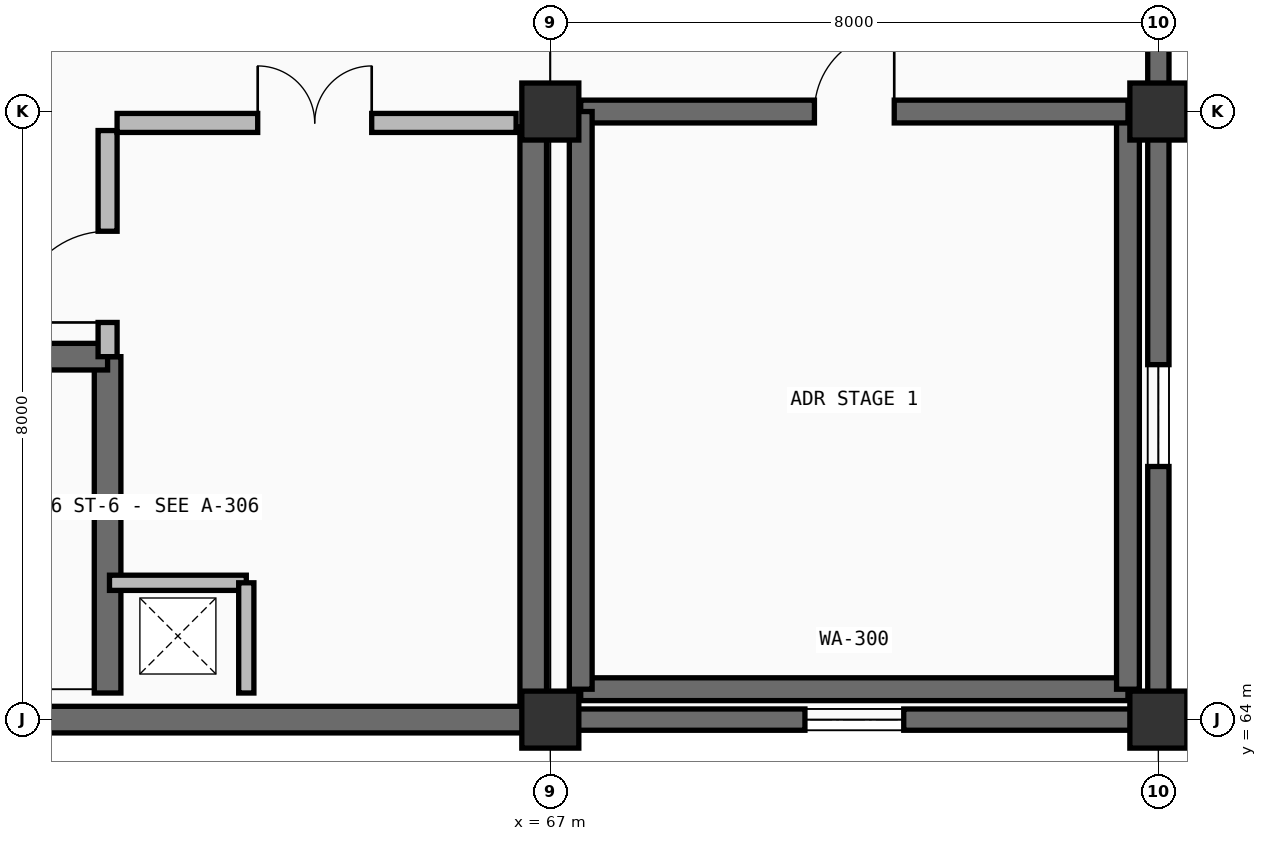
"""IFC4 building model, lengths in metres.
Left out: names, types, materials, properties, quantities, classifications, styles, units other than length and angle.
Written with IfcOpenShell. Run it as: python <this file> out.ifc"""

import sys

from ifc_helpers import new_model, si_unit, direction, frame, frame_2d, origin, origin_2d, place, context, subcontext, project, spatial, rectangle, extrude, element, fill, save


model = new_model("IFC4")
c1 = context("Model", 3, precision=1e-05, world=origin(), true_north=direction((0.0, 1.0)))
c2 = subcontext(c1, "Body", "Model", "MODEL_VIEW")
j1 = project(units=[si_unit("LENGTHUNIT", "METRE"), si_unit("PLANEANGLEUNIT", "RADIAN")], contexts=[c1])
p1 = place(None, origin())
s1 = spatial("IfcSite", under=j1, at=p1, CompositionType="ELEMENT")
p2 = place(p1, origin())
s2 = spatial("IfcBuilding", under=s1, at=p2, CompositionType="ELEMENT")
p3 = place(p2, frame((0.0, 0.0, 5.4)))
s3 = spatial("IfcBuildingStorey", under=s2, at=p3, CompositionType="ELEMENT", Elevation=5.4)
for number, where, z_axis, x_axis in (
    (1, (67.0, 64.0, 0.0), (0.0, 0.0, 1.0), (1.0, 0.0, 0.0)),
    (2, (67.0, 72.0, 0.0), (0.0, 0.0, 1.0), (1.0, 0.0, 0.0)),
    (3, (75.0, 64.0, 0.0), (0.0, 0.0, 1.0), (1.0, 0.0, 0.0)),
    (4, (75.0, 72.0, 0.0), (0.0, 0.0, 1.0), (1.0, 0.0, 0.0)),
):
    element("IfcColumn", number, at=place(p3, frame(where, z_axis=z_axis, x_axis=x_axis)), inside=s3, PredefinedType="COLUMN", context=c2, shape_type="SweptSolid", body=[
        extrude(rectangle(XDim=0.75, YDim=0.75, at=origin_2d()), origin(), (0.0, 0.0, 1.0), 4.5),
    ])
p4 = place(p3, frame((75.0, 80.0, 0.0), z_axis=(0.0, 0.0, 1.0), x_axis=(0.0, -1.0, 0.0)))
e5 = element("IfcWall", 5, at=p4, inside=s3, PredefinedType="SOLIDWALL", context=c2, shape_type="SweptSolid", body=[
    extrude(rectangle(XDim=8.0, YDim=0.28, at=frame_2d((4.0, 0.0))), origin(), (0.0, 0.0, 1.0), 4.5),
])
p5 = place(p4, frame((3.4, 0.0, 0.85)))
e6 = element("IfcOpeningElement", 6, at=p5, cuts=e5, PredefinedType="OPENING", context=c2, shape_type="SweptSolid", body=[
    extrude(rectangle(XDim=1.2, YDim=2.2, at=frame_2d((0.6, 1.1))), frame((0.0, 0.15, 0.0), z_axis=(0.0, -1.0, 0.0), x_axis=(1.0, 0.0, 0.0)), (0.0, 0.0, 1.0), 0.3),
])
p6 = place(p3, frame((75.0, 72.0, 0.0), z_axis=(0.0, 0.0, 1.0), x_axis=(0.0, -1.0, 0.0)))
e7 = element("IfcWall", 7, at=p6, inside=s3, PredefinedType="SOLIDWALL", context=c2, shape_type="SweptSolid", body=[
    extrude(rectangle(XDim=8.0, YDim=0.28, at=frame_2d((4.0, 0.0))), origin(), (0.0, 0.0, 1.0), 4.5),
])
p7 = place(p6, frame((3.33, 0.0, 0.85)))
e8 = element("IfcOpeningElement", 8, at=p7, cuts=e7, PredefinedType="OPENING", context=c2, shape_type="SweptSolid", body=[
    extrude(rectangle(XDim=1.34, YDim=2.5, at=frame_2d((0.67, 1.25))), frame((0.0, 0.15, 0.0), z_axis=(0.0, -1.0, 0.0), x_axis=(1.0, 0.0, 0.0)), (0.0, 0.0, 1.0), 0.3),
])
p8 = place(p3, frame((75.0, 64.0, 0.0), z_axis=(0.0, 0.0, 1.0), x_axis=(-1.0, 0.0, 0.0)))
e9 = element("IfcWall", 9, at=p8, inside=s3, PredefinedType="SOLIDWALL", context=c2, shape_type="SweptSolid", body=[
    extrude(rectangle(XDim=8.0, YDim=0.28, at=frame_2d((4.0, 0.0))), origin(), (0.0, 0.0, 1.0), 4.5),
])
p9 = place(p8, frame((3.35, 0.0, 0.85)))
e10 = element("IfcOpeningElement", 10, at=p9, cuts=e9, PredefinedType="OPENING", context=c2, shape_type="SweptSolid", body=[
    extrude(rectangle(XDim=1.3, YDim=2.4, at=frame_2d((0.65, 1.2))), frame((0.0, 0.15, 0.0), z_axis=(0.0, -1.0, 0.0), x_axis=(1.0, 0.0, 0.0)), (0.0, 0.0, 1.0), 0.3),
])
p10 = place(p3, frame((67.0, 64.0, 0.0), z_axis=(0.0, 0.0, 1.0), x_axis=(-1.0, 0.0, 0.0)))
e11 = element("IfcWall", 11, at=p10, inside=s3, PredefinedType="SHEAR", context=c2, shape_type="SweptSolid", body=[
    extrude(rectangle(XDim=8.0, YDim=0.35, at=frame_2d((4.0, 0.0))), origin(), (0.0, 0.0, 1.0), 4.5),
])
p11 = place(p3, frame((61.175, 64.35, 0.0), z_axis=(0.0, 0.0, 1.0), x_axis=(0.0, 1.0, 0.0)))
e12 = element("IfcWall", 12, at=p11, inside=s3, PredefinedType="SHEAR", context=c2, shape_type="SweptSolid", body=[
    extrude(rectangle(XDim=4.425, YDim=0.35, at=frame_2d((2.212, 0.0))), origin(), (0.0, 0.0, 1.0), 4.2),
])
p12 = place(p3, frame((66.775, 64.2, 0.0), z_axis=(0.0, 0.0, 1.0), x_axis=(0.0, 1.0, 0.0)))
e13 = element("IfcWall", 13, at=p12, inside=s3, PredefinedType="SHEAR", context=c2, shape_type="SweptSolid", body=[
    extrude(rectangle(XDim=7.6, YDim=0.35, at=frame_2d((3.8, 0.0))), origin(), (0.0, 0.0, 1.0), 4.2),
])
p13 = place(p3, frame((61.2, 65.8, 0.0), z_axis=(0.0, 0.0, 1.0), x_axis=(1.0, 0.0, 0.0)))
e14 = element("IfcWall", 14, at=p13, inside=s3, PredefinedType="PARTITIONING", context=c2, shape_type="SweptSolid", body=[
    extrude(rectangle(XDim=1.8, YDim=0.2, at=frame_2d((0.9, 0.0))), origin(), (0.0, 0.0, 1.0), 4.2),
])
p14 = place(p3, frame((63.0, 64.35, 0.0), z_axis=(0.0, 0.0, 1.0), x_axis=(0.0, 1.0, 0.0)))
e15 = element("IfcWall", 15, at=p14, inside=s3, PredefinedType="PARTITIONING", context=c2, shape_type="SweptSolid", body=[
    extrude(rectangle(XDim=1.45, YDim=0.2, at=frame_2d((0.725, 0.0))), origin(), (0.0, 0.0, 1.0), 4.2),
])
p15 = place(p3, frame((51.35, 68.775, 0.0), z_axis=(0.0, 0.0, 1.0), x_axis=(1.0, 0.0, 0.0)))
e16 = element("IfcWall", 16, at=p15, inside=s3, PredefinedType="SHEAR", context=c2, shape_type="SweptSolid", body=[
    extrude(rectangle(XDim=9.825, YDim=0.35, at=frame_2d((4.913, 0.0))), origin(), (0.0, 0.0, 1.0), 4.2),
])
p16 = place(p15, frame((0.4, 0.0, 0.0)))
e17 = element("IfcOpeningElement", 17, at=p16, cuts=e16, PredefinedType="OPENING", context=c2, shape_type="SweptSolid", body=[
    extrude(rectangle(XDim=1.85, YDim=2.25, at=frame_2d((0.925, 1.125))), frame((0.0, 0.185, 0.0), z_axis=(0.0, -1.0, 0.0), x_axis=(1.0, 0.0, 0.0)), (0.0, 0.0, 1.0), 0.37),
])
p17 = place(p3, frame((61.175, 68.775, 0.0), z_axis=(0.0, 0.0, 1.0), x_axis=(0.0, 1.0, 0.0)))
e18 = element("IfcWall", 18, at=p17, inside=s3, PredefinedType="PARTITIONING", context=c2, shape_type="SweptSolid", body=[
    extrude(rectangle(XDim=2.975, YDim=0.25, at=frame_2d((1.488, 0.0))), origin(), (0.0, 0.0, 1.0), 4.2),
])
p18 = place(p17, frame((0.45, 0.0, 0.0)))
e19 = element("IfcOpeningElement", 19, at=p18, cuts=e18, PredefinedType="OPENING", context=c2, shape_type="SweptSolid", body=[
    extrude(rectangle(XDim=1.2, YDim=2.2, at=frame_2d((0.6, 1.1))), frame((0.0, 0.135, 0.0), z_axis=(0.0, -1.0, 0.0), x_axis=(1.0, 0.0, 0.0)), (0.0, 0.0, 1.0), 0.27),
])
p19 = place(p3, frame((61.3, 71.85, 0.0), z_axis=(0.0, 0.0, 1.0), x_axis=(1.0, 0.0, 0.0)))
e20 = element("IfcWall", 20, at=p19, inside=s3, PredefinedType="PARTITIONING", context=c2, shape_type="SweptSolid", body=[
    extrude(rectangle(XDim=5.25, YDim=0.25, at=frame_2d((2.625, 0.0))), origin(), (0.0, 0.0, 1.0), 3.435),
])
p20 = place(p19, frame((1.85, 0.0, 0.0)))
e21 = element("IfcOpeningElement", 21, at=p20, cuts=e20, PredefinedType="OPENING", context=c2, shape_type="SweptSolid", body=[
    extrude(rectangle(XDim=1.5, YDim=2.2, at=frame_2d((0.75, 1.1))), frame((0.0, 0.135, 0.0), z_axis=(0.0, -1.0, 0.0), x_axis=(1.0, 0.0, 0.0)), (0.0, 0.0, 1.0), 0.27),
])
p21 = place(p3, frame((67.4, 64.4, 0.0), z_axis=(0.0, 0.0, 1.0), x_axis=(1.0, 0.0, 0.0)))
e22 = element("IfcWall", 22, at=p21, inside=s3, PredefinedType="SHEAR", context=c2, shape_type="SweptSolid", body=[
    extrude(rectangle(XDim=7.2, YDim=0.3, at=frame_2d((3.6, 0.0))), origin(), (0.0, 0.0, 1.0), 4.2),
])
p22 = place(p3, frame((74.6, 64.4, 0.0), z_axis=(0.0, 0.0, 1.0), x_axis=(0.0, 1.0, 0.0)))
e23 = element("IfcWall", 23, at=p22, inside=s3, PredefinedType="SHEAR", context=c2, shape_type="SweptSolid", body=[
    extrude(rectangle(XDim=7.6, YDim=0.3, at=frame_2d((3.8, 0.0))), origin(), (0.0, 0.0, 1.0), 4.2),
])
p23 = place(p3, frame((67.4, 72.0, 0.0), z_axis=(0.0, 0.0, 1.0), x_axis=(1.0, 0.0, 0.0)))
e24 = element("IfcWall", 24, at=p23, inside=s3, PredefinedType="SHEAR", context=c2, shape_type="SweptSolid", body=[
    extrude(rectangle(XDim=7.2, YDim=0.3, at=frame_2d((3.6, 0.0))), origin(), (0.0, 0.0, 1.0), 4.2),
])
p24 = place(p23, frame((3.075, 0.0, 0.0)))
e25 = element("IfcOpeningElement", 25, at=p24, cuts=e24, PredefinedType="OPENING", context=c2, shape_type="SweptSolid", body=[
    extrude(rectangle(XDim=1.05, YDim=2.16, at=frame_2d((0.525, 1.08))), frame((0.0, 0.16, 0.0), z_axis=(0.0, -1.0, 0.0), x_axis=(1.0, 0.0, 0.0)), (0.0, 0.0, 1.0), 0.32),
])
p25 = place(p3, frame((67.4, 64.4, 0.0), z_axis=(0.0, 0.0, 1.0), x_axis=(0.0, 1.0, 0.0)))
e26 = element("IfcWall", 26, at=p25, inside=s3, PredefinedType="SHEAR", context=c2, shape_type="SweptSolid", body=[
    extrude(rectangle(XDim=7.6, YDim=0.3, at=frame_2d((3.8, 0.0))), origin(), (0.0, 0.0, 1.0), 4.2),
])
p26 = place(p7, origin())
e27 = element("IfcWindow", 27, at=p26, inside=s3, PartitioningType="SINGLE_PANEL", PredefinedType="WINDOW", context=c2, shape_type="SweptSolid", body=[
    extrude(rectangle(XDim=1.34, YDim=2.5, at=frame_2d((0.67, 1.25))), frame((0.0, 0.03, 0.0), z_axis=(0.0, -1.0, 0.0), x_axis=(1.0, 0.0, 0.0)), (0.0, 0.0, 1.0), 0.06),
])
fill(e8, e27)
p27 = place(p9, origin())
e28 = element("IfcWindow", 28, at=p27, inside=s3, PartitioningType="SINGLE_PANEL", PredefinedType="WINDOW", context=c2, shape_type="SweptSolid", body=[
    extrude(rectangle(XDim=1.3, YDim=2.4, at=frame_2d((0.65, 1.2))), frame((0.0, 0.03, 0.0), z_axis=(0.0, -1.0, 0.0), x_axis=(1.0, 0.0, 0.0)), (0.0, 0.0, 1.0), 0.06),
])
fill(e10, e28)
p28 = place(p18, origin())
e29 = element("IfcDoor", 29, at=p28, inside=s3, OperationType="SINGLE_SWING_LEFT", PredefinedType="DOOR", context=c2, shape_type="SweptSolid", body=[
    extrude(rectangle(XDim=1.2, YDim=2.2, at=frame_2d((0.6, 1.1))), frame((0.0, 0.025, 0.0), z_axis=(0.0, -1.0, 0.0), x_axis=(1.0, 0.0, 0.0)), (0.0, 0.0, 1.0), 0.05),
])
fill(e19, e29)
p29 = place(p20, origin())
e30 = element("IfcDoor", 30, at=p29, inside=s3, OperationType="DOUBLE_DOOR_SINGLE_SWING", PredefinedType="DOOR", context=c2, shape_type="SweptSolid", body=[
    extrude(rectangle(XDim=1.5, YDim=2.2, at=frame_2d((0.75, 1.1))), frame((0.0, 0.025, 0.0), z_axis=(0.0, -1.0, 0.0), x_axis=(1.0, 0.0, 0.0)), (0.0, 0.0, 1.0), 0.05),
])
fill(e21, e30)
p30 = place(p24, origin())
e31 = element("IfcDoor", 31, at=p30, inside=s3, OperationType="SINGLE_SWING_RIGHT", PredefinedType="DOOR", context=c2, shape_type="SweptSolid", body=[
    extrude(rectangle(XDim=1.05, YDim=2.16, at=frame_2d((0.525, 1.08))), frame((0.0, 0.025, 0.0), z_axis=(0.0, -1.0, 0.0), x_axis=(1.0, 0.0, 0.0)), (0.0, 0.0, 1.0), 0.05),
])
fill(e25, e31)
save(model, sys.argv[1])
